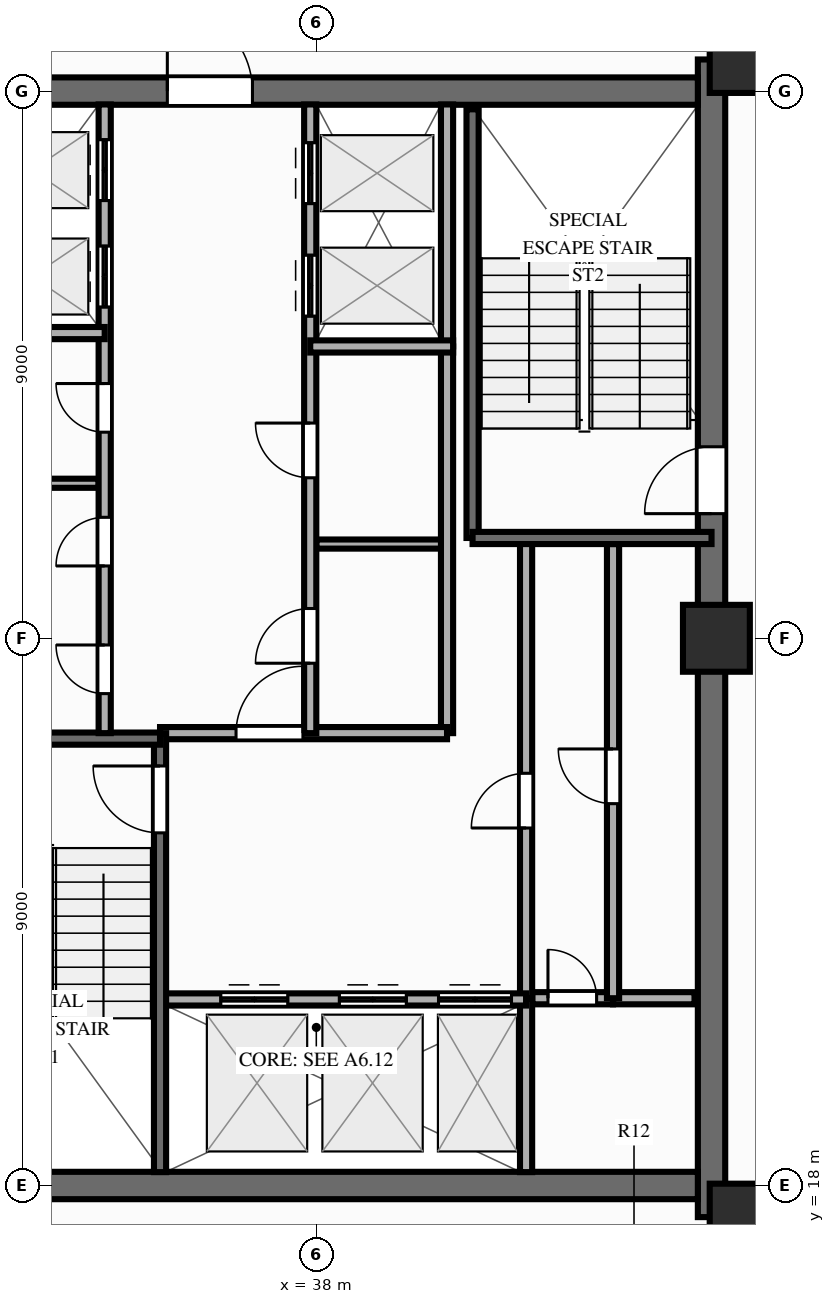
"""IFC4 building model, lengths in metres.
Left out: names, types, materials, properties, quantities, classifications, styles, units other than length and angle.
Written with IfcOpenShell. Run it as: python <this file> out.ifc"""

import sys

from ifc_helpers import new_model, si_unit, direction, frame, frame_2d, origin, origin_2d, place, context, subcontext, project, spatial, rectangle, extrude, source, transform, mapped, element, fill, save


model = new_model("IFC4")
c1 = context("Model", 3, precision=1e-05, world=origin(), true_north=direction((0.0, 1.0)))
c2 = subcontext(c1, "Body", "Model", "MODEL_VIEW")
j1 = project(units=[si_unit("LENGTHUNIT", "METRE"), si_unit("PLANEANGLEUNIT", "RADIAN")], contexts=[c1])
p1 = place(None, origin())
s1 = spatial("IfcSite", under=j1, at=p1, CompositionType="ELEMENT")
p2 = place(p1, origin())
s2 = spatial("IfcBuilding", under=s1, at=p2, CompositionType="ELEMENT")
p3 = place(p2, frame((0.0, 0.0, 182.8)))
s3 = spatial("IfcBuildingStorey", under=s2, at=p3, CompositionType="ELEMENT", Elevation=182.8)
p4 = place(p3, frame((44.5, 17.48, 0.0), z_axis=(0.0, 0.0, 1.0), x_axis=(0.0, 1.0, 0.0)))
e1 = element("IfcWall", 1, at=p4, inside=s3, PredefinedType="SHEAR", context=c2, shape_type="SweptSolid", body=[
    extrude(rectangle(XDim=19.04, YDim=0.45, at=frame_2d((9.52, 0.0))), origin(), (0.0, 0.0, 1.0), 3.9),
])
p5 = place(p4, frame((12.67, 0.0, 0.0), z_axis=(0.0, 0.0, 1.0), x_axis=(-1.0, 0.0, 0.0)))
e2 = element("IfcOpeningElement", 2, at=p5, cuts=e1, PredefinedType="OPENING", context=c2, shape_type="SweptSolid", body=[
    extrude(rectangle(XDim=1.1, YDim=2.15, at=frame_2d((0.55, 1.075))), frame((0.0, 0.237, 0.0), z_axis=(0.0, -1.0, 0.0), x_axis=(1.0, 0.0, 0.0)), (0.0, 0.0, 1.0), 0.474),
])
p6 = place(p3, frame((31.725, 18.0, 0.0), z_axis=(0.0, 0.0, 1.0), x_axis=(1.0, 0.0, 0.0)))
e3 = element("IfcWall", 3, at=p6, inside=s3, PredefinedType="SHEAR", context=c2, shape_type="SweptSolid", body=[
    extrude(rectangle(XDim=12.55, YDim=0.45, at=frame_2d((6.275, 0.0))), origin(), (0.0, 0.0, 1.0), 3.9),
])
p7 = place(p3, frame((31.725, 36.0, 0.0), z_axis=(0.0, 0.0, 1.0), x_axis=(1.0, 0.0, 0.0)))
e4 = element("IfcWall", 4, at=p7, inside=s3, PredefinedType="SHEAR", context=c2, shape_type="SweptSolid", body=[
    extrude(rectangle(XDim=12.55, YDim=0.45, at=frame_2d((6.275, 0.0))), origin(), (0.0, 0.0, 1.0), 3.9),
])
p8 = place(p7, frame((5.225, 0.0, 0.0), z_axis=(0.0, 0.0, 1.0), x_axis=(-1.0, 0.0, 0.0)))
e5 = element("IfcOpeningElement", 5, at=p8, cuts=e4, PredefinedType="OPENING", context=c2, shape_type="SweptSolid", body=[
    extrude(rectangle(XDim=1.4, YDim=2.15, at=frame_2d((0.7, 1.075))), frame((0.0, 0.237, 0.0), z_axis=(0.0, -1.0, 0.0), x_axis=(1.0, 0.0, 0.0)), (0.0, 0.0, 1.0), 0.474),
])
m1 = source(origin(), c2, "Body", "SweptSolid", [
    extrude(rectangle(XDim=1.1, YDim=1.1, at=origin_2d()), origin(), (0.0, 0.0, 1.0), 3.9),
])
for number, where, z_axis, x_axis in (
    (6, (45.02, 17.48, 0.0), (0.0, 0.0, 1.0), (1.0, 0.0, 0.0)),
    (7, (45.02, 36.52, 0.0), (0.0, 0.0, 1.0), (1.0, 0.0, 0.0)),
    (8, (44.58, 27.0, 0.0), (0.0, 0.0, 1.0), (1.0, 0.0, 0.0)),
):
    element("IfcColumn", number, at=place(p3, frame(where, z_axis=z_axis, x_axis=x_axis)), inside=s3, PredefinedType="COLUMN", context=c2, shape_type="MappedRepresentation", body=[
        mapped(m1, transform((0.0, 0.0, 0.0), scale=1.0)),
    ])
p9 = place(p3, frame((32.15, 29.55, 0.0), z_axis=(0.0, 0.0, 1.0), x_axis=(1.0, 0.0, 0.0)))
e9 = element("IfcWall", 9, at=p9, inside=s3, PredefinedType="PARTITIONING", context=c2, shape_type="SweptSolid", body=[
    extrude(rectangle(XDim=2.27, YDim=0.15, at=frame_2d((1.135, 0.0))), origin(), (0.0, 0.0, 1.0), 3.69),
])
p10 = place(p3, frame((38.0, 28.55, 0.0), z_axis=(0.0, 0.0, 1.0), x_axis=(1.0, 0.0, 0.0)))
e10 = element("IfcWall", 10, at=p10, inside=s3, PredefinedType="PARTITIONING", context=c2, shape_type="SweptSolid", body=[
    extrude(rectangle(XDim=2.2, YDim=0.15, at=frame_2d((1.1, 0.0))), origin(), (0.0, 0.0, 1.0), 3.04),
])
p11 = place(p3, frame((41.55, 21.08, 0.0), z_axis=(0.0, 0.0, 1.0), x_axis=(1.0, 0.0, 0.0)))
e11 = element("IfcWall", 11, at=p11, inside=s3, PredefinedType="PARTITIONING", context=c2, shape_type="SweptSolid", body=[
    extrude(rectangle(XDim=1.33, YDim=0.2, at=frame_2d((0.665, 0.0))), origin(), (0.0, 0.0, 1.0), 3.69),
])
p12 = place(p11, frame((0.26, 0.0, 0.0)))
e12 = element("IfcOpeningElement", 12, at=p12, cuts=e11, PredefinedType="OPENING", context=c2, shape_type="SweptSolid", body=[
    extrude(rectangle(XDim=0.8, YDim=2.05, at=frame_2d((0.4, 1.025))), frame((0.0, 0.112, 0.0), z_axis=(0.0, -1.0, 0.0), x_axis=(1.0, 0.0, 0.0)), (0.0, 0.0, 1.0), 0.224),
])
p13 = place(p3, frame((42.88, 21.08, 0.0), z_axis=(0.0, 0.0, 1.0), x_axis=(1.0, 0.0, 0.0)))
e13 = element("IfcWall", 13, at=p13, inside=s3, PredefinedType="PARTITIONING", context=c2, shape_type="SweptSolid", body=[
    extrude(rectangle(XDim=1.34, YDim=0.2, at=frame_2d((0.67, 0.0))), origin(), (0.0, 0.0, 1.0), 3.69),
])
p14 = place(p3, frame((42.88, 21.08, 0.0), z_axis=(0.0, 0.0, 1.0), x_axis=(0.0, 1.0, 0.0)))
e14 = element("IfcWall", 14, at=p14, inside=s3, PredefinedType="PARTITIONING", context=c2, shape_type="SweptSolid", body=[
    extrude(rectangle(XDim=7.47, YDim=0.2, at=frame_2d((3.735, 0.0))), origin(), (0.0, 0.0, 1.0), 3.69),
])
p15 = place(p14, frame((3.2, 0.0, 0.0)))
e15 = element("IfcOpeningElement", 15, at=p15, cuts=e14, PredefinedType="OPENING", context=c2, shape_type="SweptSolid", body=[
    extrude(rectangle(XDim=0.9, YDim=2.1, at=frame_2d((0.45, 1.05))), frame((0.0, 0.112, 0.0), z_axis=(0.0, -1.0, 0.0), x_axis=(1.0, 0.0, 0.0)), (0.0, 0.0, 1.0), 0.224),
])
p16 = place(p3, frame((41.45, 18.22, 0.0), z_axis=(0.0, 0.0, 1.0), x_axis=(0.0, 1.0, 0.0)))
e16 = element("IfcWall", 16, at=p16, inside=s3, PredefinedType="PARTITIONING", context=c2, shape_type="SweptSolid", body=[
    extrude(rectangle(XDim=2.86, YDim=0.2, at=frame_2d((1.43, 0.0))), origin(), (0.0, 0.0, 1.0), 3.69),
])
p17 = place(p3, frame((41.45, 21.08, 0.0), z_axis=(0.0, 0.0, 1.0), x_axis=(0.0, 1.0, 0.0)))
e17 = element("IfcWall", 17, at=p17, inside=s3, PredefinedType="PARTITIONING", context=c2, shape_type="SweptSolid", body=[
    extrude(rectangle(XDim=7.52, YDim=0.2, at=frame_2d((3.76, 0.0))), origin(), (0.0, 0.0, 1.0), 3.69),
])
p18 = place(p17, frame((2.8, 0.0, 0.0)))
e18 = element("IfcOpeningElement", 18, at=p18, cuts=e17, PredefinedType="OPENING", context=c2, shape_type="SweptSolid", body=[
    extrude(rectangle(XDim=0.9, YDim=2.1, at=frame_2d((0.45, 1.05))), frame((0.0, 0.112, 0.0), z_axis=(0.0, -1.0, 0.0), x_axis=(1.0, 0.0, 0.0)), (0.0, 0.0, 1.0), 0.224),
])
p19 = place(p3, frame((40.15, 25.44, 0.0), z_axis=(0.0, 0.0, 1.0), x_axis=(0.0, 1.0, 0.0)))
e19 = element("IfcWall", 19, at=p19, inside=s3, PredefinedType="PARTITIONING", context=c2, shape_type="SweptSolid", body=[
    extrude(rectangle(XDim=6.36, YDim=0.2, at=frame_2d((3.18, 0.0))), origin(), (0.0, 0.0, 1.0), 3.69),
])
p20 = place(p3, frame((40.15, 31.8, 0.0), z_axis=(0.0, 0.0, 1.0), x_axis=(0.0, 1.0, 0.0)))
e20 = element("IfcWall", 20, at=p20, inside=s3, PredefinedType="PARTITIONING", context=c2, shape_type="SweptSolid", body=[
    extrude(rectangle(XDim=3.98, YDim=0.2, at=frame_2d((1.99, 0.0))), origin(), (0.0, 0.0, 1.0), 3.69),
])
p21 = place(p3, frame((35.43, 21.06, 0.0), z_axis=(0.0, 0.0, 1.0), x_axis=(1.0, 0.0, 0.0)))
e21 = element("IfcWall", 21, at=p21, inside=s3, PredefinedType="PARTITIONING", context=c2, shape_type="SweptSolid", body=[
    extrude(rectangle(XDim=6.02, YDim=0.2, at=frame_2d((3.01, 0.0))), origin(), (0.0, 0.0, 1.0), 3.69),
])
p22 = place(p21, frame((1.0, 0.0, 0.0)))
e22 = element("IfcOpeningElement", 22, at=p22, cuts=e21, PredefinedType="OPENING", context=c2, shape_type="SweptSolid", body=[
    extrude(rectangle(XDim=1.1, YDim=2.15, at=frame_2d((0.55, 1.075))), frame((0.0, 0.112, 0.0), z_axis=(0.0, -1.0, 0.0), x_axis=(1.0, 0.0, 0.0)), (0.0, 0.0, 1.0), 0.224),
])
p23 = place(p21, frame((2.95, 0.0, 0.0)))
e23 = element("IfcOpeningElement", 23, at=p23, cuts=e21, PredefinedType="OPENING", context=c2, shape_type="SweptSolid", body=[
    extrude(rectangle(XDim=1.1, YDim=2.15, at=frame_2d((0.55, 1.075))), frame((0.0, 0.112, 0.0), z_axis=(0.0, -1.0, 0.0), x_axis=(1.0, 0.0, 0.0)), (0.0, 0.0, 1.0), 0.224),
])
p24 = place(p21, frame((4.58, 0.0, 0.0)))
e24 = element("IfcOpeningElement", 24, at=p24, cuts=e21, PredefinedType="OPENING", context=c2, shape_type="SweptSolid", body=[
    extrude(rectangle(XDim=1.2, YDim=2.15, at=frame_2d((0.6, 1.075))), frame((0.0, 0.112, 0.0), z_axis=(0.0, -1.0, 0.0), x_axis=(1.0, 0.0, 0.0)), (0.0, 0.0, 1.0), 0.224),
])
p25 = place(p3, frame((35.43, 25.44, 0.0), z_axis=(0.0, 0.0, 1.0), x_axis=(1.0, 0.0, 0.0)))
e25 = element("IfcWall", 25, at=p25, inside=s3, PredefinedType="PARTITIONING", context=c2, shape_type="SweptSolid", body=[
    extrude(rectangle(XDim=4.72, YDim=0.2, at=frame_2d((2.36, 0.0))), origin(), (0.0, 0.0, 1.0), 3.69),
])
p26 = place(p25, frame((1.25, 0.0, 0.0)))
e26 = element("IfcOpeningElement", 26, at=p26, cuts=e25, PredefinedType="OPENING", context=c2, shape_type="SweptSolid", body=[
    extrude(rectangle(XDim=1.1, YDim=2.15, at=frame_2d((0.55, 1.075))), frame((0.0, 0.112, 0.0), z_axis=(0.0, -1.0, 0.0), x_axis=(1.0, 0.0, 0.0)), (0.0, 0.0, 1.0), 0.224),
])
p27 = place(p3, frame((35.43, 18.22, 0.0), z_axis=(0.0, 0.0, 1.0), x_axis=(0.0, 1.0, 0.0)))
e27 = element("IfcWall", 27, at=p27, inside=s3, PredefinedType="SOLIDWALL", context=c2, shape_type="SweptSolid", body=[
    extrude(rectangle(XDim=7.22, YDim=0.2, at=frame_2d((3.61, 0.0))), origin(), (0.0, 0.0, 1.0), 3.69),
])
p28 = place(p27, frame((6.68, 0.0, 0.0), z_axis=(0.0, 0.0, 1.0), x_axis=(-1.0, 0.0, 0.0)))
e28 = element("IfcOpeningElement", 28, at=p28, cuts=e27, PredefinedType="OPENING", context=c2, shape_type="SweptSolid", body=[
    extrude(rectangle(XDim=1.1, YDim=2.15, at=frame_2d((0.55, 1.075))), frame((0.0, 0.112, 0.0), z_axis=(0.0, -1.0, 0.0), x_axis=(1.0, 0.0, 0.0)), (0.0, 0.0, 1.0), 0.224),
])
p29 = place(p3, frame((31.5, 25.35, 0.0), z_axis=(0.0, 0.0, 1.0), x_axis=(1.0, 0.0, 0.0)))
e29 = element("IfcWall", 29, at=p29, inside=s3, PredefinedType="SOLIDWALL", context=c2, shape_type="SweptSolid", body=[
    extrude(rectangle(XDim=3.93, YDim=0.2, at=frame_2d((1.965, 0.0))), origin(), (0.0, 0.0, 1.0), 3.69),
])
p30 = place(p3, frame((40.57, 28.65, 0.0), z_axis=(0.0, 0.0, 1.0), x_axis=(0.0, 1.0, 0.0)))
e30 = element("IfcWall", 30, at=p30, inside=s3, PredefinedType="SOLIDWALL", context=c2, shape_type="SweptSolid", body=[
    extrude(rectangle(XDim=7.05, YDim=0.2, at=frame_2d((3.525, 0.0))), origin(), (0.0, 0.0, 1.0), 3.69),
])
p31 = place(p3, frame((40.57, 28.65, 0.0), z_axis=(0.0, 0.0, 1.0), x_axis=(1.0, 0.0, 0.0)))
e31 = element("IfcWall", 31, at=p31, inside=s3, PredefinedType="SOLIDWALL", context=c2, shape_type="SweptSolid", body=[
    extrude(rectangle(XDim=3.93, YDim=0.2, at=frame_2d((1.965, 0.0))), origin(), (0.0, 0.0, 1.0), 3.69),
])
p32 = place(p3, frame((34.52, 25.44, 0.0), z_axis=(0.0, 0.0, 1.0), x_axis=(0.0, 1.0, 0.0)))
e32 = element("IfcWall", 32, at=p32, inside=s3, PredefinedType="PARTITIONING", context=c2, shape_type="SweptSolid", body=[
    extrude(rectangle(XDim=10.34, YDim=0.2, at=frame_2d((5.17, 0.0))), origin(), (0.0, 0.0, 1.0), 3.69),
])
p33 = place(p32, frame((0.65, 0.0, 0.0)))
e33 = element("IfcOpeningElement", 33, at=p33, cuts=e32, PredefinedType="OPENING", context=c2, shape_type="SweptSolid", body=[
    extrude(rectangle(XDim=0.8, YDim=2.05, at=frame_2d((0.4, 1.025))), frame((0.0, 0.112, 0.0), z_axis=(0.0, -1.0, 0.0), x_axis=(1.0, 0.0, 0.0)), (0.0, 0.0, 1.0), 0.224),
])
p34 = place(p32, frame((2.75, 0.0, 0.0)))
e34 = element("IfcOpeningElement", 34, at=p34, cuts=e32, PredefinedType="OPENING", context=c2, shape_type="SweptSolid", body=[
    extrude(rectangle(XDim=0.8, YDim=2.05, at=frame_2d((0.4, 1.025))), frame((0.0, 0.112, 0.0), z_axis=(0.0, -1.0, 0.0), x_axis=(1.0, 0.0, 0.0)), (0.0, 0.0, 1.0), 0.224),
])
p35 = place(p32, frame((4.95, 0.0, 0.0)))
e35 = element("IfcOpeningElement", 35, at=p35, cuts=e32, PredefinedType="OPENING", context=c2, shape_type="SweptSolid", body=[
    extrude(rectangle(XDim=0.8, YDim=2.05, at=frame_2d((0.4, 1.025))), frame((0.0, 0.112, 0.0), z_axis=(0.0, -1.0, 0.0), x_axis=(1.0, 0.0, 0.0)), (0.0, 0.0, 1.0), 0.224),
])
p36 = place(p32, frame((7.01, 0.0, 0.0)))
e36 = element("IfcOpeningElement", 36, at=p36, cuts=e32, PredefinedType="OPENING", context=c2, shape_type="SweptSolid", body=[
    extrude(rectangle(XDim=1.0, YDim=2.15, at=frame_2d((0.5, 1.075))), frame((0.0, 0.112, 0.0), z_axis=(0.0, -1.0, 0.0), x_axis=(1.0, 0.0, 0.0)), (0.0, 0.0, 1.0), 0.224),
])
p37 = place(p32, frame((8.76, 0.0, 0.0)))
e37 = element("IfcOpeningElement", 37, at=p37, cuts=e32, PredefinedType="OPENING", context=c2, shape_type="SweptSolid", body=[
    extrude(rectangle(XDim=1.0, YDim=2.15, at=frame_2d((0.5, 1.075))), frame((0.0, 0.112, 0.0), z_axis=(0.0, -1.0, 0.0), x_axis=(1.0, 0.0, 0.0)), (0.0, 0.0, 1.0), 0.224),
])
p38 = place(p3, frame((31.72, 32.02, 0.0), z_axis=(0.0, 0.0, 1.0), x_axis=(1.0, 0.0, 0.0)))
e38 = element("IfcWall", 38, at=p38, inside=s3, PredefinedType="PARTITIONING", context=c2, shape_type="SweptSolid", body=[
    extrude(rectangle(XDim=2.8, YDim=0.2, at=frame_2d((1.4, 0.0))), origin(), (0.0, 0.0, 1.0), 3.69),
])
p39 = place(p3, frame((37.9, 25.44, 0.0), z_axis=(0.0, 0.0, 1.0), x_axis=(0.0, 1.0, 0.0)))
e39 = element("IfcWall", 39, at=p39, inside=s3, PredefinedType="PARTITIONING", context=c2, shape_type="SweptSolid", body=[
    extrude(rectangle(XDim=10.34, YDim=0.2, at=frame_2d((5.17, 0.0))), origin(), (0.0, 0.0, 1.0), 3.69),
])
p40 = place(p39, frame((1.15, 0.0, 0.0)))
e40 = element("IfcOpeningElement", 40, at=p40, cuts=e39, PredefinedType="OPENING", context=c2, shape_type="SweptSolid", body=[
    extrude(rectangle(XDim=0.9, YDim=2.1, at=frame_2d((0.45, 1.05))), frame((0.0, 0.112, 0.0), z_axis=(0.0, -1.0, 0.0), x_axis=(1.0, 0.0, 0.0)), (0.0, 0.0, 1.0), 0.224),
])
p41 = place(p39, frame((4.2, 0.0, 0.0)))
e41 = element("IfcOpeningElement", 41, at=p41, cuts=e39, PredefinedType="OPENING", context=c2, shape_type="SweptSolid", body=[
    extrude(rectangle(XDim=0.9, YDim=2.1, at=frame_2d((0.45, 1.05))), frame((0.0, 0.112, 0.0), z_axis=(0.0, -1.0, 0.0), x_axis=(1.0, 0.0, 0.0)), (0.0, 0.0, 1.0), 0.224),
])
p42 = place(p39, frame((6.86, 0.0, 0.0)))
e42 = element("IfcOpeningElement", 42, at=p42, cuts=e39, PredefinedType="OPENING", context=c2, shape_type="SweptSolid", body=[
    extrude(rectangle(XDim=1.0, YDim=2.15, at=frame_2d((0.5, 1.075))), frame((0.0, 0.112, 0.0), z_axis=(0.0, -1.0, 0.0), x_axis=(1.0, 0.0, 0.0)), (0.0, 0.0, 1.0), 0.224),
])
p43 = place(p39, frame((8.71, 0.0, 0.0)))
e43 = element("IfcOpeningElement", 43, at=p43, cuts=e39, PredefinedType="OPENING", context=c2, shape_type="SweptSolid", body=[
    extrude(rectangle(XDim=1.0, YDim=2.15, at=frame_2d((0.5, 1.075))), frame((0.0, 0.112, 0.0), z_axis=(0.0, -1.0, 0.0), x_axis=(1.0, 0.0, 0.0)), (0.0, 0.0, 1.0), 0.224),
])
p44 = place(p3, frame((37.9, 31.8, 0.0), z_axis=(0.0, 0.0, 1.0), x_axis=(1.0, 0.0, 0.0)))
e44 = element("IfcWall", 44, at=p44, inside=s3, PredefinedType="PARTITIONING", context=c2, shape_type="SweptSolid", body=[
    extrude(rectangle(XDim=2.35, YDim=0.2, at=frame_2d((1.175, 0.0))), origin(), (0.0, 0.0, 1.0), 3.69),
])
m2 = source(origin(), c2, "Body", "SweptSolid", [
    extrude(rectangle(XDim=1.1, YDim=2.15, at=frame_2d((0.55, 1.075))), frame((0.0, 0.025, 0.0), z_axis=(0.0, -1.0, 0.0), x_axis=(1.0, 0.0, 0.0)), (0.0, 0.0, 1.0), 0.05),
])
p45 = place(p5, origin())
e45 = element("IfcDoor", 45, at=p45, inside=s3, OperationType="SINGLE_SWING_RIGHT", PredefinedType="DOOR", context=c2, shape_type="MappedRepresentation", body=[
    mapped(m2, transform((0.0, 0.0, 0.0), scale=1.0)),
])
fill(e2, e45)
m3 = source(origin(), c2, "Body", "SweptSolid", [
    extrude(rectangle(XDim=1.4, YDim=2.15, at=frame_2d((0.7, 1.075))), frame((0.0, 0.025, 0.0), z_axis=(0.0, -1.0, 0.0), x_axis=(1.0, 0.0, 0.0)), (0.0, 0.0, 1.0), 0.05),
])
p46 = place(p8, origin())
e46 = element("IfcDoor", 46, at=p46, inside=s3, OperationType="SINGLE_SWING_RIGHT", PredefinedType="DOOR", context=c2, shape_type="MappedRepresentation", body=[
    mapped(m3, transform((0.0, 0.0, 0.0), scale=1.0)),
])
fill(e5, e46)
m4 = source(origin(), c2, "Body", "SweptSolid", [
    extrude(rectangle(XDim=0.8, YDim=2.05, at=frame_2d((0.4, 1.025))), frame((0.0, 0.025, 0.0), z_axis=(0.0, -1.0, 0.0), x_axis=(1.0, 0.0, 0.0)), (0.0, 0.0, 1.0), 0.05),
])
p47 = place(p12, origin())
e47 = element("IfcDoor", 47, at=p47, inside=s3, OperationType="SINGLE_SWING_LEFT", PredefinedType="DOOR", context=c2, shape_type="MappedRepresentation", body=[
    mapped(m4, transform((0.0, 0.0, 0.0), scale=1.0)),
])
fill(e12, e47)
m5 = source(origin(), c2, "Body", "SweptSolid", [
    extrude(rectangle(XDim=0.9, YDim=2.1, at=frame_2d((0.45, 1.05))), frame((0.0, 0.025, 0.0), z_axis=(0.0, -1.0, 0.0), x_axis=(1.0, 0.0, 0.0)), (0.0, 0.0, 1.0), 0.05),
])
p48 = place(p15, origin())
e48 = element("IfcDoor", 48, at=p48, inside=s3, OperationType="SINGLE_SWING_RIGHT", PredefinedType="DOOR", context=c2, shape_type="MappedRepresentation", body=[
    mapped(m5, transform((0.0, 0.0, 0.0), scale=1.0)),
])
fill(e15, e48)
p49 = place(p18, origin())
e49 = element("IfcDoor", 49, at=p49, inside=s3, OperationType="SINGLE_SWING_LEFT", PredefinedType="DOOR", context=c2, shape_type="MappedRepresentation", body=[
    mapped(m5, transform((0.0, 0.0, 0.0), scale=1.0)),
])
fill(e18, e49)
p50 = place(p22, origin())
e50 = element("IfcDoor", 50, at=p50, inside=s3, OperationType="DOUBLE_DOOR_SLIDING", PredefinedType="DOOR", context=c2, shape_type="MappedRepresentation", body=[
    mapped(m2, transform((0.0, 0.0, 0.0), scale=1.0)),
])
fill(e22, e50)
p51 = place(p23, origin())
e51 = element("IfcDoor", 51, at=p51, inside=s3, OperationType="DOUBLE_DOOR_SLIDING", PredefinedType="DOOR", context=c2, shape_type="MappedRepresentation", body=[
    mapped(m2, transform((0.0, 0.0, 0.0), scale=1.0)),
])
fill(e23, e51)
m6 = source(origin(), c2, "Body", "SweptSolid", [
    extrude(rectangle(XDim=1.2, YDim=2.15, at=frame_2d((0.6, 1.075))), frame((0.0, 0.025, 0.0), z_axis=(0.0, -1.0, 0.0), x_axis=(1.0, 0.0, 0.0)), (0.0, 0.0, 1.0), 0.05),
])
p52 = place(p24, origin())
e52 = element("IfcDoor", 52, at=p52, inside=s3, OperationType="DOUBLE_DOOR_SLIDING", PredefinedType="DOOR", context=c2, shape_type="MappedRepresentation", body=[
    mapped(m6, transform((0.0, 0.0, 0.0), scale=1.0)),
])
fill(e24, e52)
p53 = place(p26, origin())
e53 = element("IfcDoor", 53, at=p53, inside=s3, OperationType="SINGLE_SWING_RIGHT", PredefinedType="DOOR", context=c2, shape_type="MappedRepresentation", body=[
    mapped(m2, transform((0.0, 0.0, 0.0), scale=1.0)),
])
fill(e26, e53)
p54 = place(p28, origin())
e54 = element("IfcDoor", 54, at=p54, inside=s3, OperationType="SINGLE_SWING_LEFT", PredefinedType="DOOR", context=c2, shape_type="MappedRepresentation", body=[
    mapped(m2, transform((0.0, 0.0, 0.0), scale=1.0)),
])
fill(e28, e54)
p55 = place(p33, origin())
e55 = element("IfcDoor", 55, at=p55, inside=s3, OperationType="SINGLE_SWING_RIGHT", PredefinedType="DOOR", context=c2, shape_type="MappedRepresentation", body=[
    mapped(m4, transform((0.0, 0.0, 0.0), scale=1.0)),
])
fill(e33, e55)
p56 = place(p34, origin())
e56 = element("IfcDoor", 56, at=p56, inside=s3, OperationType="SINGLE_SWING_LEFT", PredefinedType="DOOR", context=c2, shape_type="MappedRepresentation", body=[
    mapped(m4, transform((0.0, 0.0, 0.0), scale=1.0)),
])
fill(e34, e56)
p57 = place(p35, origin())
e57 = element("IfcDoor", 57, at=p57, inside=s3, OperationType="SINGLE_SWING_RIGHT", PredefinedType="DOOR", context=c2, shape_type="MappedRepresentation", body=[
    mapped(m4, transform((0.0, 0.0, 0.0), scale=1.0)),
])
fill(e35, e57)
m7 = source(origin(), c2, "Body", "SweptSolid", [
    extrude(rectangle(XDim=1.0, YDim=2.15, at=frame_2d((0.5, 1.075))), frame((0.0, 0.025, 0.0), z_axis=(0.0, -1.0, 0.0), x_axis=(1.0, 0.0, 0.0)), (0.0, 0.0, 1.0), 0.05),
])
p58 = place(p36, origin())
e58 = element("IfcDoor", 58, at=p58, inside=s3, OperationType="DOUBLE_DOOR_SLIDING", PredefinedType="DOOR", context=c2, shape_type="MappedRepresentation", body=[
    mapped(m7, transform((0.0, 0.0, 0.0), scale=1.0)),
])
fill(e36, e58)
p59 = place(p37, origin())
e59 = element("IfcDoor", 59, at=p59, inside=s3, OperationType="DOUBLE_DOOR_SLIDING", PredefinedType="DOOR", context=c2, shape_type="MappedRepresentation", body=[
    mapped(m7, transform((0.0, 0.0, 0.0), scale=1.0)),
])
fill(e37, e59)
p60 = place(p40, origin())
e60 = element("IfcDoor", 60, at=p60, inside=s3, OperationType="SINGLE_SWING_LEFT", PredefinedType="DOOR", context=c2, shape_type="MappedRepresentation", body=[
    mapped(m5, transform((0.0, 0.0, 0.0), scale=1.0)),
])
fill(e40, e60)
p61 = place(p41, origin())
e61 = element("IfcDoor", 61, at=p61, inside=s3, OperationType="SINGLE_SWING_RIGHT", PredefinedType="DOOR", context=c2, shape_type="MappedRepresentation", body=[
    mapped(m5, transform((0.0, 0.0, 0.0), scale=1.0)),
])
fill(e41, e61)
p62 = place(p42, origin())
e62 = element("IfcDoor", 62, at=p62, inside=s3, OperationType="DOUBLE_DOOR_SLIDING", PredefinedType="DOOR", context=c2, shape_type="MappedRepresentation", body=[
    mapped(m7, transform((0.0, 0.0, 0.0), scale=1.0)),
])
fill(e42, e62)
p63 = place(p43, origin())
e63 = element("IfcDoor", 63, at=p63, inside=s3, OperationType="DOUBLE_DOOR_SLIDING", PredefinedType="DOOR", context=c2, shape_type="MappedRepresentation", body=[
    mapped(m7, transform((0.0, 0.0, 0.0), scale=1.0)),
])
fill(e43, e63)
save(model, sys.argv[1])
